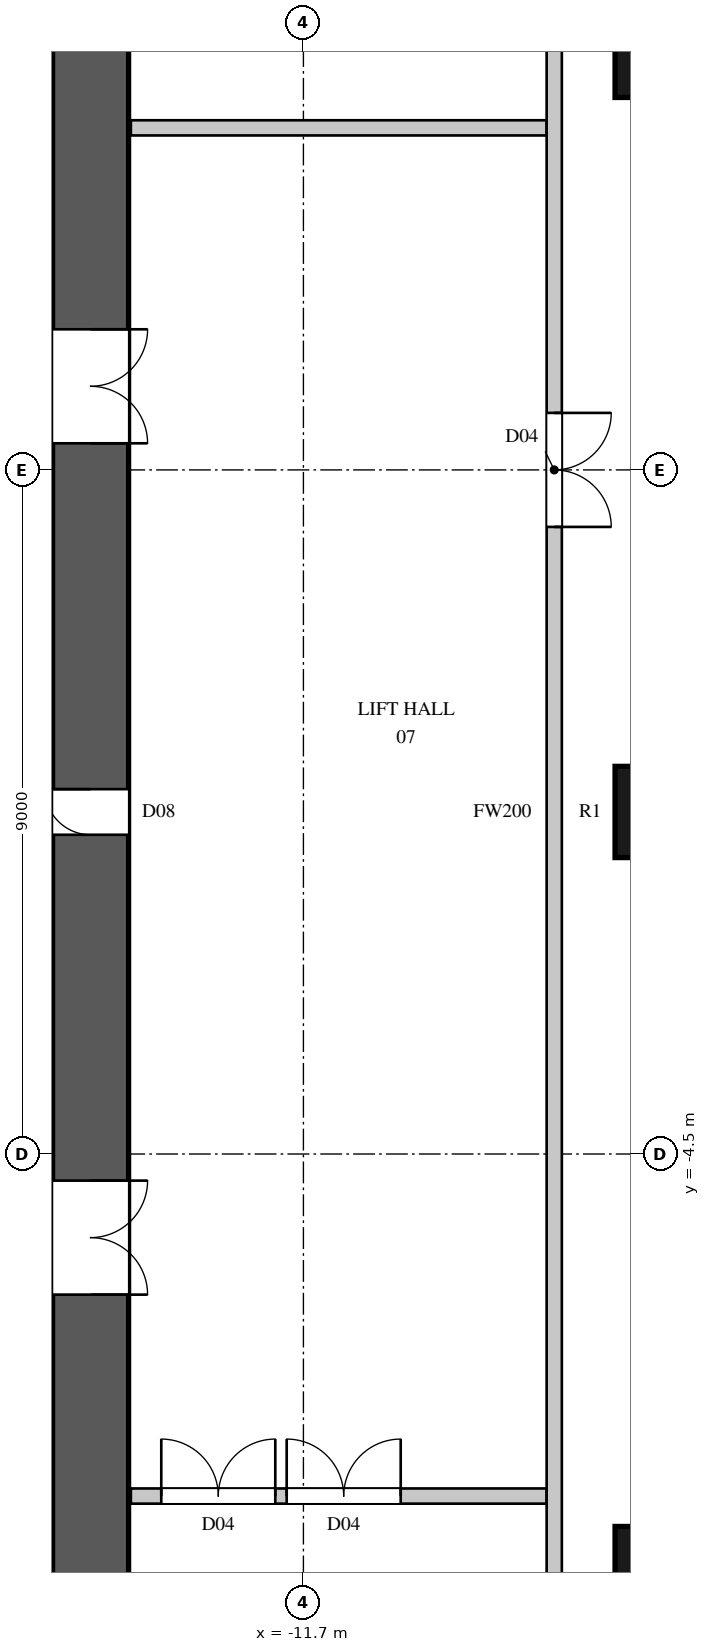
"""IFC4 building model, lengths in metres.
Left out: names, types, materials, properties, quantities, classifications, styles, units other than length and angle.
Written with IfcOpenShell. Run it as: python <this file> out.ifc"""

import sys

from ifc_helpers import new_model, si_unit, direction, frame, frame_2d, origin, origin_2d, place, context, subcontext, project, spatial, rectangle, circle, extrude, element, fill, save


model = new_model("IFC4")
c1 = context("Model", 3, precision=1e-05, world=origin(), true_north=direction((0.0, 1.0)))
c2 = subcontext(c1, "Body", "Model", "MODEL_VIEW")
j1 = project(units=[si_unit("LENGTHUNIT", "METRE"), si_unit("PLANEANGLEUNIT", "RADIAN")], contexts=[c1])
p1 = place(None, origin())
s1 = spatial("IfcSite", under=j1, at=p1, CompositionType="ELEMENT")
p2 = place(p1, origin())
s2 = spatial("IfcBuilding", under=s1, at=p2, CompositionType="ELEMENT")
p3 = place(p2, frame((0.0, 0.0, 55.5)))
s3 = spatial("IfcBuildingStorey", under=s2, at=p3, CompositionType="ELEMENT", Elevation=55.5)
for number, where, z_axis, x_axis in (
    (1, (-7.0, -10.0, 0.0), (0.0, 0.0, 1.0), (1.0, 0.0, 0.0)),
    (2, (-7.0, 0.0, 0.0), (0.0, 0.0, 1.0), (1.0, 0.0, 0.0)),
    (3, (-7.0, 10.0, 0.0), (0.0, 0.0, 1.0), (1.0, 0.0, 0.0)),
):
    element("IfcColumn", number, at=place(p3, frame(where, z_axis=z_axis, x_axis=x_axis)), inside=s3, PredefinedType="COLUMN", context=c2, shape_type="SweptSolid", body=[
        extrude(circle(Radius=0.6, at=origin_2d()), origin(), (0.0, 0.0, 1.0), 3.6),
    ])
p4 = place(p3, frame((-14.5, -14.8, 0.0), z_axis=(0.0, 0.0, 1.0), x_axis=(0.0, 1.0, 0.0)))
e4 = element("IfcWall", 4, at=p4, inside=s3, PredefinedType="SHEAR", context=c2, shape_type="SweptSolid", body=[
    extrude(rectangle(XDim=29.6, YDim=1.0, at=frame_2d((14.8, 0.0))), origin(), (0.0, 0.0, 1.0), 3.6),
])
p5 = place(p4, frame((8.45, 0.0, 0.0)))
e5 = element("IfcOpeningElement", 5, at=p5, cuts=e4, PredefinedType="OPENING", context=c2, shape_type="SweptSolid", body=[
    extrude(rectangle(XDim=1.5, YDim=2.4, at=frame_2d((0.75, 1.2))), frame((0.0, 0.51, 0.0), z_axis=(0.0, -1.0, 0.0), x_axis=(1.0, 0.0, 0.0)), (0.0, 0.0, 1.0), 1.02),
])
p6 = place(p4, frame((19.65, 0.0, 0.0)))
e6 = element("IfcOpeningElement", 6, at=p6, cuts=e4, PredefinedType="OPENING", context=c2, shape_type="SweptSolid", body=[
    extrude(rectangle(XDim=1.5, YDim=2.4, at=frame_2d((0.75, 1.2))), frame((0.0, 0.51, 0.0), z_axis=(0.0, -1.0, 0.0), x_axis=(1.0, 0.0, 0.0)), (0.0, 0.0, 1.0), 1.02),
])
p7 = place(p4, frame((14.5, 0.0, 0.0)))
e7 = element("IfcOpeningElement", 7, at=p7, cuts=e4, PredefinedType="OPENING", context=c2, shape_type="SweptSolid", body=[
    extrude(rectangle(XDim=0.6, YDim=2.0, at=frame_2d((0.3, 1.0))), frame((0.0, 0.51, 0.0), z_axis=(0.0, -1.0, 0.0), x_axis=(1.0, 0.0, 0.0)), (0.0, 0.0, 1.0), 1.02),
])
p8 = place(p3, frame((-13.97, -9.0, 0.0), z_axis=(0.0, 0.0, 1.0), x_axis=(1.0, 0.0, 0.0)))
e8 = element("IfcWall", 8, at=p8, inside=s3, PredefinedType="PARTITIONING", context=c2, shape_type="SweptSolid", body=[
    extrude(rectangle(XDim=5.47, YDim=0.2, at=frame_2d((2.735, 0.0))), origin(), (0.0, 0.0, 1.0), 3.3),
])
p9 = place(p8, frame((0.4, 0.0, 0.0)))
e9 = element("IfcOpeningElement", 9, at=p9, cuts=e8, PredefinedType="OPENING", context=c2, shape_type="SweptSolid", body=[
    extrude(rectangle(XDim=1.5, YDim=2.2, at=frame_2d((0.75, 1.1))), frame((0.0, 0.11, 0.0), z_axis=(0.0, -1.0, 0.0), x_axis=(1.0, 0.0, 0.0)), (0.0, 0.0, 1.0), 0.22),
])
p10 = place(p8, frame((2.05, 0.0, 0.0)))
e10 = element("IfcOpeningElement", 10, at=p10, cuts=e8, PredefinedType="OPENING", context=c2, shape_type="SweptSolid", body=[
    extrude(rectangle(XDim=1.5, YDim=2.2, at=frame_2d((0.75, 1.1))), frame((0.0, 0.11, 0.0), z_axis=(0.0, -1.0, 0.0), x_axis=(1.0, 0.0, 0.0)), (0.0, 0.0, 1.0), 0.22),
])
p11 = place(p3, frame((-13.97, 9.0, 0.0), z_axis=(0.0, 0.0, 1.0), x_axis=(1.0, 0.0, 0.0)))
e11 = element("IfcWall", 11, at=p11, inside=s3, PredefinedType="PARTITIONING", context=c2, shape_type="SweptSolid", body=[
    extrude(rectangle(XDim=5.47, YDim=0.2, at=frame_2d((2.735, 0.0))), origin(), (0.0, 0.0, 1.0), 3.3),
])
p12 = place(p3, frame((-8.4, -15.3, 0.0), z_axis=(0.0, 0.0, 1.0), x_axis=(0.0, 1.0, 0.0)))
e12 = element("IfcWall", 12, at=p12, inside=s3, PredefinedType="PARTITIONING", context=c2, shape_type="SweptSolid", body=[
    extrude(rectangle(XDim=30.6, YDim=0.2, at=frame_2d((15.3, 0.0))), origin(), (0.0, 0.0, 1.0), 3.3),
])
p13 = place(p12, frame((19.05, 0.0, 0.0)))
e13 = element("IfcOpeningElement", 13, at=p13, cuts=e12, PredefinedType="OPENING", context=c2, shape_type="SweptSolid", body=[
    extrude(rectangle(XDim=1.5, YDim=2.2, at=frame_2d((0.75, 1.1))), frame((0.0, 0.11, 0.0), z_axis=(0.0, -1.0, 0.0), x_axis=(1.0, 0.0, 0.0)), (0.0, 0.0, 1.0), 0.22),
])
p14 = place(p12, frame((29.55, 0.0, 0.0)))
e14 = element("IfcOpeningElement", 14, at=p14, cuts=e12, PredefinedType="OPENING", context=c2, shape_type="SweptSolid", body=[
    extrude(rectangle(XDim=0.9, YDim=2.2, at=frame_2d((0.45, 1.1))), frame((0.0, 0.11, 0.0), z_axis=(0.0, -1.0, 0.0), x_axis=(1.0, 0.0, 0.0)), (0.0, 0.0, 1.0), 0.22),
])
p15 = place(p12, frame((0.15, 0.0, 0.0)))
e15 = element("IfcOpeningElement", 15, at=p15, cuts=e12, PredefinedType="OPENING", context=c2, shape_type="SweptSolid", body=[
    extrude(rectangle(XDim=0.9, YDim=2.2, at=frame_2d((0.45, 1.1))), frame((0.0, 0.11, 0.0), z_axis=(0.0, -1.0, 0.0), x_axis=(1.0, 0.0, 0.0)), (0.0, 0.0, 1.0), 0.22),
])
p16 = place(p13, origin())
e16 = element("IfcDoor", 16, at=p16, inside=s3, OperationType="DOUBLE_DOOR_SINGLE_SWING", PredefinedType="DOOR", context=c2, shape_type="SweptSolid", body=[
    extrude(rectangle(XDim=1.5, YDim=2.2, at=frame_2d((0.75, 1.1))), frame((0.0, 0.025, 0.0), z_axis=(0.0, -1.0, 0.0), x_axis=(1.0, 0.0, 0.0)), (0.0, 0.0, 1.0), 0.05),
])
fill(e13, e16)
p17 = place(p9, origin())
e17 = element("IfcDoor", 17, at=p17, inside=s3, OperationType="DOUBLE_DOOR_SINGLE_SWING", PredefinedType="DOOR", context=c2, shape_type="SweptSolid", body=[
    extrude(rectangle(XDim=1.5, YDim=2.2, at=frame_2d((0.75, 1.1))), frame((0.0, 0.025, 0.0), z_axis=(0.0, -1.0, 0.0), x_axis=(1.0, 0.0, 0.0)), (0.0, 0.0, 1.0), 0.05),
])
fill(e9, e17)
p18 = place(p10, origin())
e18 = element("IfcDoor", 18, at=p18, inside=s3, OperationType="DOUBLE_DOOR_SINGLE_SWING", PredefinedType="DOOR", context=c2, shape_type="SweptSolid", body=[
    extrude(rectangle(XDim=1.5, YDim=2.2, at=frame_2d((0.75, 1.1))), frame((0.0, 0.025, 0.0), z_axis=(0.0, -1.0, 0.0), x_axis=(1.0, 0.0, 0.0)), (0.0, 0.0, 1.0), 0.05),
])
fill(e10, e18)
p19 = place(p5, origin())
e19 = element("IfcDoor", 19, at=p19, inside=s3, OperationType="DOUBLE_DOOR_SINGLE_SWING", PredefinedType="DOOR", context=c2, shape_type="SweptSolid", body=[
    extrude(rectangle(XDim=1.5, YDim=2.4, at=frame_2d((0.75, 1.2))), frame((0.0, -0.445, 0.0), z_axis=(0.0, -1.0, 0.0), x_axis=(1.0, 0.0, 0.0)), (0.0, 0.0, 1.0), 0.05),
])
fill(e5, e19)
p20 = place(p6, origin())
e20 = element("IfcDoor", 20, at=p20, inside=s3, OperationType="DOUBLE_DOOR_SINGLE_SWING", PredefinedType="DOOR", context=c2, shape_type="SweptSolid", body=[
    extrude(rectangle(XDim=1.5, YDim=2.4, at=frame_2d((0.75, 1.2))), frame((0.0, -0.445, 0.0), z_axis=(0.0, -1.0, 0.0), x_axis=(1.0, 0.0, 0.0)), (0.0, 0.0, 1.0), 0.05),
])
fill(e6, e20)
p21 = place(p7, origin())
e21 = element("IfcDoor", 21, at=p21, inside=s3, OperationType="SINGLE_SWING_RIGHT", PredefinedType="DOOR", context=c2, shape_type="SweptSolid", body=[
    extrude(rectangle(XDim=0.6, YDim=2.0, at=frame_2d((0.3, 1.0))), frame((0.0, 0.495, 0.0), z_axis=(0.0, -1.0, 0.0), x_axis=(1.0, 0.0, 0.0)), (0.0, 0.0, 1.0), 0.05),
])
fill(e7, e21)
save(model, sys.argv[1])
